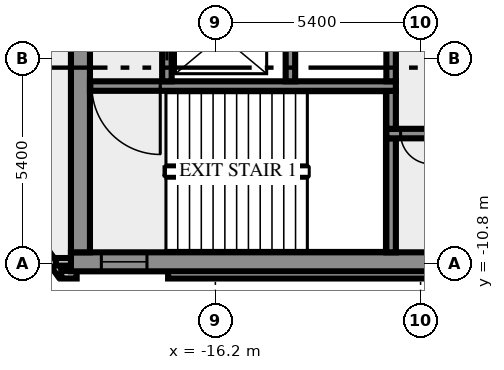
"""IFC4 building model, lengths in metres.
Left out: names, types, materials, properties, quantities, classifications, styles, units other than length and angle.
Written with IfcOpenShell. Run it as: python <this file> out.ifc"""

import sys

from ifc_helpers import new_model, si_unit, direction, frame, frame_2d, origin, place, context, subcontext, project, spatial, rectangle, extrude, element, fill, save


model = new_model("IFC4")
c1 = context("Model", 3, precision=1e-05, world=origin(), true_north=direction((0.0, 1.0)))
c2 = subcontext(c1, "Body", "Model", "MODEL_VIEW")
j1 = project(units=[si_unit("LENGTHUNIT", "METRE"), si_unit("PLANEANGLEUNIT", "RADIAN")], contexts=[c1])
p1 = place(None, origin())
s1 = spatial("IfcSite", under=j1, at=p1, CompositionType="ELEMENT")
p2 = place(p1, origin())
s2 = spatial("IfcBuilding", under=s1, at=p2, CompositionType="ELEMENT")
p3 = place(p2, frame((0.0, 0.0, 281.0)))
s3 = spatial("IfcBuildingStorey", under=s2, at=p3, CompositionType="ELEMENT", Elevation=281.0)
p4 = place(p3, frame((-21.833, -8.909, 0.0), z_axis=(0.0, 0.0, 1.0), x_axis=(0.587766567315, -0.809030569476, 0.0)))
e1 = element("IfcWall", 1, at=p4, inside=s3, PredefinedType="SOLIDWALL", context=c2, shape_type="SweptSolid", body=[
    extrude(rectangle(XDim=2.688, YDim=0.2, at=frame_2d((1.344, 0.0))), origin(), (0.0, 0.0, 1.0), 3.65),
])
p5 = place(p3, frame((-20.256, -11.088, 0.0), z_axis=(0.0, 0.0, 1.0), x_axis=(1.0, 0.0, 0.0)))
e2 = element("IfcWall", 2, at=p5, inside=s3, PredefinedType="SOLIDWALL", context=c2, shape_type="SweptSolid", body=[
    extrude(rectangle(XDim=0.406, YDim=0.2, at=frame_2d((0.203, 0.0))), origin(), (0.0, 0.0, 1.0), 3.65),
])
p6 = place(p3, frame((-17.444, -11.088, 0.0), z_axis=(0.0, 0.0, 1.0), x_axis=(1.0, 0.0, 0.0)))
e3 = element("IfcWall", 3, at=p6, inside=s3, PredefinedType="SOLIDWALL", context=c2, shape_type="SweptSolid", body=[
    extrude(rectangle(XDim=34.888, YDim=0.2, at=frame_2d((17.444, 0.0))), origin(), (0.0, 0.0, 1.0), 3.65),
])
p7 = place(p3, frame((-19.98, -10.75, 0.0), z_axis=(0.0, 0.0, 1.0), x_axis=(-1.0, 0.0, 0.0)))
e4 = element("IfcWall", 4, at=p7, inside=s3, PredefinedType="SOLIDWALL", context=c2, shape_type="SweptSolid", body=[
    extrude(rectangle(XDim=0.417, YDim=0.2, at=frame_2d((0.208, 0.0))), origin(), (0.0, 0.0, 1.0), 3.65),
])
p8 = place(p3, frame((-20.0, -10.75, 0.0), z_axis=(0.0, 0.0, 1.0), x_axis=(1.0, 0.0, 0.0)))
e5 = element("IfcWall", 5, at=p8, inside=s3, PredefinedType="SHEAR", context=c2, shape_type="SweptSolid", body=[
    extrude(rectangle(XDim=40.0, YDim=0.5, at=frame_2d((20.0, 0.0))), origin(), (0.0, 0.0, 1.0), 3.65),
])
p9 = place(p8, frame((0.8, 0.0, 1.0)))
e6 = element("IfcOpeningElement", 6, at=p9, cuts=e5, PredefinedType="OPENING", context=c2, shape_type="SweptSolid", body=[
    extrude(rectangle(XDim=1.2, YDim=1.2, at=frame_2d((0.6, 0.6))), frame((0.0, 0.26, 0.0), z_axis=(0.0, -1.0, 0.0), x_axis=(1.0, 0.0, 0.0)), (0.0, 0.0, 1.0), 0.52),
])
p10 = place(p8, frame((38.0, 0.0, 1.0)))
e7 = element("IfcOpeningElement", 7, at=p10, cuts=e5, PredefinedType="OPENING", context=c2, shape_type="SweptSolid", body=[
    extrude(rectangle(XDim=1.2, YDim=1.2, at=frame_2d((0.6, 0.6))), frame((0.0, 0.26, 0.0), z_axis=(0.0, -1.0, 0.0), x_axis=(1.0, 0.0, 0.0)), (0.0, 0.0, 1.0), 0.52),
])
p11 = place(p3, frame((-19.75, -10.5, 0.0), z_axis=(0.0, 0.0, 1.0), x_axis=(0.0, 1.0, 0.0)))
e8 = element("IfcWall", 8, at=p11, inside=s3, PredefinedType="SHEAR", context=c2, shape_type="SweptSolid", body=[
    extrude(rectangle(XDim=8.8, YDim=0.5, at=frame_2d((4.4, 0.0))), origin(), (0.0, 0.0, 1.0), 3.65),
])
p12 = place(p3, frame((-11.575, -10.5, 0.0), z_axis=(0.0, 0.0, 1.0), x_axis=(0.0, 1.0, 0.0)))
e9 = element("IfcWall", 9, at=p12, inside=s3, PredefinedType="SHEAR", context=c2, shape_type="SweptSolid", body=[
    extrude(rectangle(XDim=3.0, YDim=0.25, at=frame_2d((1.5, 0.0))), origin(), (0.0, 0.0, 1.0), 3.65),
])
p13 = place(p3, frame((11.7, -7.375, 0.0), z_axis=(0.0, 0.0, 1.0), x_axis=(-1.0, 0.0, 0.0)))
e10 = element("IfcWall", 10, at=p13, inside=s3, PredefinedType="SHEAR", context=c2, shape_type="SweptSolid", body=[
    extrude(rectangle(XDim=23.4, YDim=0.25, at=frame_2d((11.7, 0.0))), origin(), (0.0, 0.0, 1.0), 3.65),
])
p14 = place(p13, frame((22.225, 0.0, 0.0)))
e11 = element("IfcOpeningElement", 11, at=p14, cuts=e10, PredefinedType="OPENING", context=c2, shape_type="SweptSolid", body=[
    extrude(rectangle(XDim=0.8, YDim=2.1, at=frame_2d((0.4, 1.05))), frame((0.0, 0.135, 0.0), z_axis=(0.0, -1.0, 0.0), x_axis=(1.0, 0.0, 0.0)), (0.0, 0.0, 1.0), 0.27),
])
p15 = place(p13, frame((20.2, 0.0, 0.0)))
e12 = element("IfcOpeningElement", 12, at=p15, cuts=e10, PredefinedType="OPENING", context=c2, shape_type="SweptSolid", body=[
    extrude(rectangle(XDim=1.1, YDim=2.1, at=frame_2d((0.55, 1.05))), frame((0.0, 0.135, 0.0), z_axis=(0.0, -1.0, 0.0), x_axis=(1.0, 0.0, 0.0)), (0.0, 0.0, 1.0), 0.27),
])
p16 = place(p13, frame((17.7, 0.0, 0.0)))
e13 = element("IfcOpeningElement", 13, at=p16, cuts=e10, PredefinedType="OPENING", context=c2, shape_type="SweptSolid", body=[
    extrude(rectangle(XDim=1.1, YDim=2.1, at=frame_2d((0.55, 1.05))), frame((0.0, 0.135, 0.0), z_axis=(0.0, -1.0, 0.0), x_axis=(1.0, 0.0, 0.0)), (0.0, 0.0, 1.0), 0.27),
])
p17 = place(p13, frame((15.975, 0.0, 0.0)))
e14 = element("IfcOpeningElement", 14, at=p17, cuts=e10, PredefinedType="OPENING", context=c2, shape_type="SweptSolid", body=[
    extrude(rectangle(XDim=0.8, YDim=2.1, at=frame_2d((0.4, 1.05))), frame((0.0, 0.135, 0.0), z_axis=(0.0, -1.0, 0.0), x_axis=(1.0, 0.0, 0.0)), (0.0, 0.0, 1.0), 0.27),
])
p18 = place(p13, frame((14.75, 0.0, 0.0)))
e15 = element("IfcOpeningElement", 15, at=p18, cuts=e10, PredefinedType="OPENING", context=c2, shape_type="SweptSolid", body=[
    extrude(rectangle(XDim=0.7, YDim=2.1, at=frame_2d((0.35, 1.05))), frame((0.0, 0.135, 0.0), z_axis=(0.0, -1.0, 0.0), x_axis=(1.0, 0.0, 0.0)), (0.0, 0.0, 1.0), 0.27),
])
p19 = place(p13, frame((13.35, 0.0, 0.0)))
e16 = element("IfcOpeningElement", 16, at=p19, cuts=e10, PredefinedType="OPENING", context=c2, shape_type="SweptSolid", body=[
    extrude(rectangle(XDim=0.9, YDim=2.1, at=frame_2d((0.45, 1.05))), frame((0.0, 0.135, 0.0), z_axis=(0.0, -1.0, 0.0), x_axis=(1.0, 0.0, 0.0)), (0.0, 0.0, 1.0), 0.27),
])
p20 = place(p13, frame((11.975, 0.0, 0.0)))
e17 = element("IfcOpeningElement", 17, at=p20, cuts=e10, PredefinedType="OPENING", context=c2, shape_type="SweptSolid", body=[
    extrude(rectangle(XDim=0.9, YDim=2.1, at=frame_2d((0.45, 1.05))), frame((0.0, 0.135, 0.0), z_axis=(0.0, -1.0, 0.0), x_axis=(1.0, 0.0, 0.0)), (0.0, 0.0, 1.0), 0.27),
])
p21 = place(p13, frame((10.5, 0.0, 0.0)))
e18 = element("IfcOpeningElement", 18, at=p21, cuts=e10, PredefinedType="OPENING", context=c2, shape_type="SweptSolid", body=[
    extrude(rectangle(XDim=0.9, YDim=2.1, at=frame_2d((0.45, 1.05))), frame((0.0, 0.135, 0.0), z_axis=(0.0, -1.0, 0.0), x_axis=(1.0, 0.0, 0.0)), (0.0, 0.0, 1.0), 0.27),
])
p22 = place(p13, frame((8.663, 0.0, 0.0)))
e19 = element("IfcOpeningElement", 19, at=p22, cuts=e10, PredefinedType="OPENING", context=c2, shape_type="SweptSolid", body=[
    extrude(rectangle(XDim=0.9, YDim=2.1, at=frame_2d((0.45, 1.05))), frame((0.0, 0.135, 0.0), z_axis=(0.0, -1.0, 0.0), x_axis=(1.0, 0.0, 0.0)), (0.0, 0.0, 1.0), 0.27),
])
p23 = place(p13, frame((6.05, 0.0, 0.0)))
e20 = element("IfcOpeningElement", 20, at=p23, cuts=e10, PredefinedType="OPENING", context=c2, shape_type="SweptSolid", body=[
    extrude(rectangle(XDim=0.9, YDim=2.1, at=frame_2d((0.45, 1.05))), frame((0.0, 0.135, 0.0), z_axis=(0.0, -1.0, 0.0), x_axis=(1.0, 0.0, 0.0)), (0.0, 0.0, 1.0), 0.27),
])
p24 = place(p13, frame((2.088, 0.0, 0.0)))
e21 = element("IfcOpeningElement", 21, at=p24, cuts=e10, PredefinedType="OPENING", context=c2, shape_type="SweptSolid", body=[
    extrude(rectangle(XDim=0.9, YDim=2.1, at=frame_2d((0.45, 1.05))), frame((0.0, 0.135, 0.0), z_axis=(0.0, -1.0, 0.0), x_axis=(1.0, 0.0, 0.0)), (0.0, 0.0, 1.0), 0.27),
])
p25 = place(p3, frame((-11.575, -7.25, 0.0), z_axis=(0.0, 0.0, 1.0), x_axis=(0.0, 1.0, 0.0)))
e22 = element("IfcWall", 22, at=p25, inside=s3, PredefinedType="SHEAR", context=c2, shape_type="SweptSolid", body=[
    extrude(rectangle(XDim=1.0, YDim=0.25, at=frame_2d((0.5, 0.0))), origin(), (0.0, 0.0, 1.0), 3.65),
])
p26 = place(p3, frame((-11.45, -6.125, 0.0), z_axis=(0.0, 0.0, 1.0), x_axis=(-1.0, 0.0, 0.0)))
e23 = element("IfcWall", 23, at=p26, inside=s3, PredefinedType="SHEAR", context=c2, shape_type="SweptSolid", body=[
    extrude(rectangle(XDim=8.05, YDim=0.25, at=frame_2d((4.025, 0.0))), origin(), (0.0, 0.0, 1.0), 3.65),
])
p27 = place(p26, frame((6.2, 0.0, 0.0)))
e24 = element("IfcOpeningElement", 24, at=p27, cuts=e23, PredefinedType="OPENING", context=c2, shape_type="SweptSolid", body=[
    extrude(rectangle(XDim=1.8, YDim=2.1, at=frame_2d((0.9, 1.05))), frame((0.0, 0.135, 0.0), z_axis=(0.0, -1.0, 0.0), x_axis=(1.0, 0.0, 0.0)), (0.0, 0.0, 1.0), 0.27),
])
p28 = place(p3, frame((-17.475, -6.0, 0.0), z_axis=(0.0, 0.0, 1.0), x_axis=(0.0, 1.0, 0.0)))
e25 = element("IfcWall", 25, at=p28, inside=s3, PredefinedType="SHEAR", context=c2, shape_type="SweptSolid", body=[
    extrude(rectangle(XDim=4.3, YDim=0.25, at=frame_2d((2.15, 0.0))), origin(), (0.0, 0.0, 1.0), 3.65),
])
p29 = place(p28, frame((0.55, 0.0, 0.0)))
e26 = element("IfcOpeningElement", 26, at=p29, cuts=e25, PredefinedType="OPENING", context=c2, shape_type="SweptSolid", body=[
    extrude(rectangle(XDim=1.3, YDim=2.1, at=frame_2d((0.65, 1.05))), frame((0.0, 0.135, 0.0), z_axis=(0.0, -1.0, 0.0), x_axis=(1.0, 0.0, 0.0)), (0.0, 0.0, 1.0), 0.27),
])
for number, where, z_axis, x_axis in (
    (27, (-14.225, -6.0, 0.0), (0.0, 0.0, 1.0), (0.0, 1.0, 0.0)),
    (28, (-11.575, -6.0, 0.0), (0.0, 0.0, 1.0), (0.0, 1.0, 0.0)),
):
    element("IfcWall", number, at=place(p3, frame(where, z_axis=z_axis, x_axis=x_axis)), inside=s3, PredefinedType="SHEAR", context=c2, shape_type="SweptSolid", body=[
        extrude(rectangle(XDim=1.75, YDim=0.25, at=frame_2d((0.875, 0.0))), origin(), (0.0, 0.0, 1.0), 3.65),
    ])
p30 = place(p9, origin())
e29 = element("IfcWindow", 29, at=p30, inside=s3, PartitioningType="SINGLE_PANEL", PredefinedType="WINDOW", context=c2, shape_type="SweptSolid", body=[
    extrude(rectangle(XDim=1.2, YDim=1.2, at=frame_2d((0.6, 0.6))), frame((0.0, 0.03, 0.0), z_axis=(0.0, -1.0, 0.0), x_axis=(1.0, 0.0, 0.0)), (0.0, 0.0, 1.0), 0.06),
])
fill(e6, e29)
p31 = place(p14, origin())
e30 = element("IfcDoor", 30, at=p31, inside=s3, OperationType="SINGLE_SWING_RIGHT", PredefinedType="DOOR", context=c2, shape_type="SweptSolid", body=[
    extrude(rectangle(XDim=0.8, YDim=2.1, at=frame_2d((0.4, 1.05))), frame((0.0, 0.025, 0.0), z_axis=(0.0, -1.0, 0.0), x_axis=(1.0, 0.0, 0.0)), (0.0, 0.0, 1.0), 0.05),
])
fill(e11, e30)
p32 = place(p27, origin())
e31 = element("IfcDoor", 31, at=p32, inside=s3, OperationType="DOUBLE_DOOR_SINGLE_SWING", PredefinedType="DOOR", context=c2, shape_type="SweptSolid", body=[
    extrude(rectangle(XDim=1.8, YDim=2.1, at=frame_2d((0.9, 1.05))), frame((0.0, 0.025, 0.0), z_axis=(0.0, -1.0, 0.0), x_axis=(1.0, 0.0, 0.0)), (0.0, 0.0, 1.0), 0.05),
])
fill(e24, e31)
p33 = place(p29, origin())
e32 = element("IfcDoor", 32, at=p33, inside=s3, OperationType="DOUBLE_DOOR_SLIDING", PredefinedType="DOOR", context=c2, shape_type="SweptSolid", body=[
    extrude(rectangle(XDim=1.3, YDim=2.1, at=frame_2d((0.65, 1.05))), frame((0.0, 0.025, 0.0), z_axis=(0.0, -1.0, 0.0), x_axis=(1.0, 0.0, 0.0)), (0.0, 0.0, 1.0), 0.05),
])
fill(e26, e32)
save(model, sys.argv[1])
